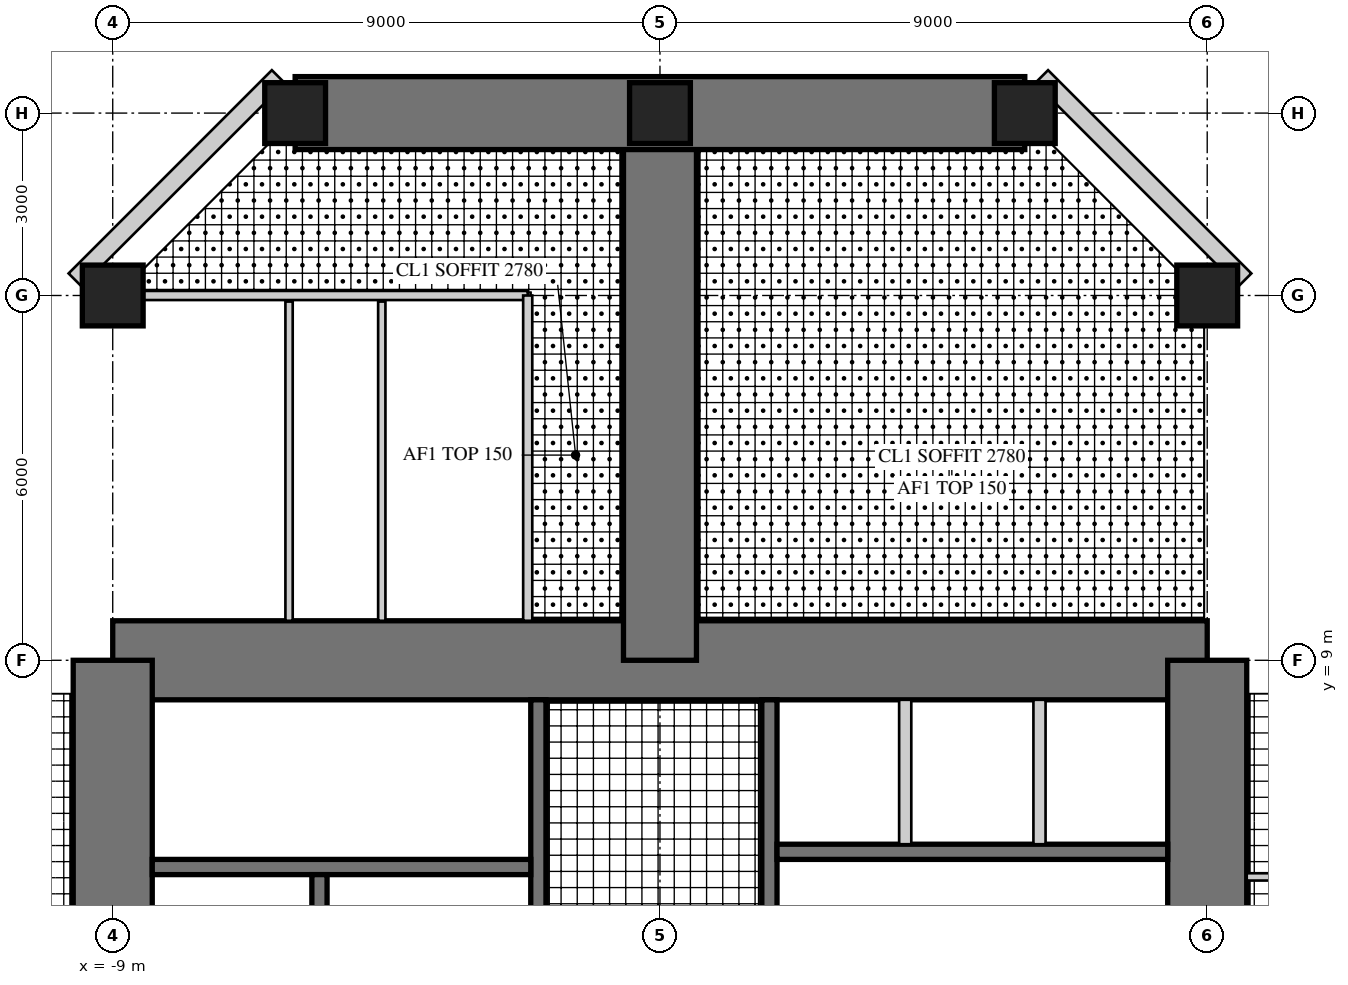
"""IFC4 building model, lengths in metres.
Left out: names, types, materials, properties, quantities, classifications, styles, units other than length and angle.
Written with IfcOpenShell. Run it as: python <this file> out.ifc"""

import sys

from ifc_helpers import new_model, si_unit, direction, frame, frame_2d, origin, origin_2d, place, context, subcontext, project, spatial, rectangle, hollow_rectangle, extrude, element, fill, save


model = new_model("IFC4")
c1 = context("Model", 3, precision=1e-05, world=origin(), true_north=direction((0.0, 1.0)))
c2 = subcontext(c1, "Body", "Model", "MODEL_VIEW")
j1 = project(units=[si_unit("LENGTHUNIT", "METRE"), si_unit("PLANEANGLEUNIT", "RADIAN")], contexts=[c1])
p1 = place(None, origin())
s1 = spatial("IfcSite", under=j1, at=p1, CompositionType="ELEMENT")
p2 = place(p1, origin())
s2 = spatial("IfcBuilding", under=s1, at=p2, CompositionType="ELEMENT")
p3 = place(p2, frame((0.0, 0.0, 144.5)))
s3 = spatial("IfcBuildingStorey", under=s2, at=p3, CompositionType="ELEMENT", Elevation=144.5)
p4 = place(p3, frame((9.0, 9.0, 0.0), z_axis=(0.0, 0.0, 1.0), x_axis=(-1.0, 0.0, 0.0)))
e1 = element("IfcWall", 1, at=p4, inside=s3, PredefinedType="SHEAR", context=c2, shape_type="SweptSolid", body=[
    extrude(rectangle(XDim=18.0, YDim=1.3, at=frame_2d((9.0, 0.0))), origin(), (0.0, 0.0, 1.0), 4.0),
])
p5 = place(p4, frame((9.8, 0.0, 0.0)))
e2 = element("IfcOpeningElement", 2, at=p5, cuts=e1, PredefinedType="OPENING", context=c2, shape_type="SweptSolid", body=[
    extrude(rectangle(XDim=1.0, YDim=2.4, at=frame_2d((0.5, 1.2))), frame((0.0, 0.66, 0.0), z_axis=(0.0, -1.0, 0.0), x_axis=(1.0, 0.0, 0.0)), (0.0, 0.0, 1.0), 1.32),
])
p6 = place(p3, frame((9.0, -9.0, 0.0), z_axis=(0.0, 0.0, 1.0), x_axis=(0.0, 1.0, 0.0)))
e3 = element("IfcWall", 3, at=p6, inside=s3, PredefinedType="SHEAR", context=c2, shape_type="SweptSolid", body=[
    extrude(rectangle(XDim=18.0, YDim=1.3, at=frame_2d((9.0, 0.0))), origin(), (0.0, 0.0, 1.0), 4.0),
])
p7 = place(p6, frame((9.8, 0.0, 0.0)))
e4 = element("IfcOpeningElement", 4, at=p7, cuts=e3, PredefinedType="OPENING", context=c2, shape_type="SweptSolid", body=[
    extrude(rectangle(XDim=1.0, YDim=2.4, at=frame_2d((0.5, 1.2))), frame((0.0, 0.66, 0.0), z_axis=(0.0, -1.0, 0.0), x_axis=(1.0, 0.0, 0.0)), (0.0, 0.0, 1.0), 1.32),
])
p8 = place(p3, frame((-9.0, 9.0, 0.0), z_axis=(0.0, 0.0, 1.0), x_axis=(0.0, -1.0, 0.0)))
e5 = element("IfcWall", 5, at=p8, inside=s3, PredefinedType="SHEAR", context=c2, shape_type="SweptSolid", body=[
    extrude(rectangle(XDim=18.0, YDim=1.3, at=frame_2d((9.0, 0.0))), origin(), (0.0, 0.0, 1.0), 4.0),
])
p9 = place(p8, frame((9.8, 0.0, 0.0)))
e6 = element("IfcOpeningElement", 6, at=p9, cuts=e5, PredefinedType="OPENING", context=c2, shape_type="SweptSolid", body=[
    extrude(rectangle(XDim=1.0, YDim=2.4, at=frame_2d((0.5, 1.2))), frame((0.0, 0.66, 0.0), z_axis=(0.0, -1.0, 0.0), x_axis=(1.0, 0.0, 0.0)), (0.0, 0.0, 1.0), 1.32),
])
p10 = place(p3, frame((1.8, 1.875, 0.0), z_axis=(0.0, 0.0, 1.0), x_axis=(0.0, 1.0, 0.0)))
e7 = element("IfcWall", 7, at=p10, inside=s3, PredefinedType="SHEAR", context=c2, shape_type="SweptSolid", body=[
    extrude(rectangle(XDim=6.475, YDim=0.25, at=frame_2d((3.238, 0.0))), origin(), (0.0, 0.0, 1.0), 4.0),
])
p11 = place(p10, frame((1.875, 0.0, 0.0)))
e8 = element("IfcOpeningElement", 8, at=p11, cuts=e7, PredefinedType="OPENING", context=c2, shape_type="SweptSolid", body=[
    extrude(rectangle(XDim=1.6, YDim=2.4, at=frame_2d((0.8, 1.2))), frame((0.0, 0.135, 0.0), z_axis=(0.0, -1.0, 0.0), x_axis=(1.0, 0.0, 0.0)), (0.0, 0.0, 1.0), 0.27),
])
p12 = place(p3, frame((1.925, 5.85, 0.0), z_axis=(0.0, 0.0, 1.0), x_axis=(1.0, 0.0, 0.0)))
e9 = element("IfcWall", 9, at=p12, inside=s3, PredefinedType="SHEAR", context=c2, shape_type="SweptSolid", body=[
    extrude(rectangle(XDim=6.425, YDim=0.25, at=frame_2d((3.212, 0.0))), origin(), (0.0, 0.0, 1.0), 4.0),
])
p13 = place(p12, frame((0.454, 0.0, 0.0)))
e10 = element("IfcOpeningElement", 10, at=p13, cuts=e9, PredefinedType="OPENING", context=c2, shape_type="SweptSolid", body=[
    extrude(rectangle(XDim=1.1, YDim=2.2, at=frame_2d((0.55, 1.1))), frame((0.0, 0.135, 0.0), z_axis=(0.0, -1.0, 0.0), x_axis=(1.0, 0.0, 0.0)), (0.0, 0.0, 1.0), 0.27),
])
p14 = place(p12, frame((2.663, 0.0, 0.0)))
e11 = element("IfcOpeningElement", 11, at=p14, cuts=e9, PredefinedType="OPENING", context=c2, shape_type="SweptSolid", body=[
    extrude(rectangle(XDim=1.1, YDim=2.2, at=frame_2d((0.55, 1.1))), frame((0.0, 0.135, 0.0), z_axis=(0.0, -1.0, 0.0), x_axis=(1.0, 0.0, 0.0)), (0.0, 0.0, 1.0), 0.27),
])
p15 = place(p12, frame((4.871, 0.0, 0.0)))
e12 = element("IfcOpeningElement", 12, at=p15, cuts=e9, PredefinedType="OPENING", context=c2, shape_type="SweptSolid", body=[
    extrude(rectangle(XDim=1.1, YDim=2.2, at=frame_2d((0.55, 1.1))), frame((0.0, 0.135, 0.0), z_axis=(0.0, -1.0, 0.0), x_axis=(1.0, 0.0, 0.0)), (0.0, 0.0, 1.0), 0.27),
])
for number, where, z_axis, x_axis in (
    (13, (4.033, 5.975, 0.0), (0.0, 0.0, 1.0), (0.0, 1.0, 0.0)),
    (14, (6.242, 5.975, 0.0), (0.0, 0.0, 1.0), (0.0, 1.0, 0.0)),
):
    element("IfcWall", number, at=place(p3, frame(where, z_axis=z_axis, x_axis=x_axis)), inside=s3, PredefinedType="PARTITIONING", context=c2, shape_type="SweptSolid", body=[
        extrude(rectangle(XDim=2.375, YDim=0.2, at=frame_2d((1.188, 0.0))), origin(), (0.0, 0.0, 1.0), 4.0),
    ])
p16 = place(p3, frame((-2.0, 1.675, 0.0), z_axis=(0.0, 0.0, 1.0), x_axis=(0.0, 1.0, 0.0)))
e15 = element("IfcWall", 15, at=p16, inside=s3, PredefinedType="SHEAR", context=c2, shape_type="SweptSolid", body=[
    extrude(rectangle(XDim=6.675, YDim=0.25, at=frame_2d((3.337, 0.0))), origin(), (0.0, 0.0, 1.0), 4.0),
])
p17 = place(p16, frame((0.725, 0.0, 0.0)))
e16 = element("IfcOpeningElement", 16, at=p17, cuts=e15, PredefinedType="OPENING", context=c2, shape_type="SweptSolid", body=[
    extrude(rectangle(XDim=1.0, YDim=2.1, at=frame_2d((0.5, 1.05))), frame((0.0, 0.135, 0.0), z_axis=(0.0, -1.0, 0.0), x_axis=(1.0, 0.0, 0.0)), (0.0, 0.0, 1.0), 0.27),
])
p18 = place(p3, frame((-2.125, 5.6, 0.0), z_axis=(0.0, 0.0, 1.0), x_axis=(-1.0, 0.0, 0.0)))
e17 = element("IfcWall", 17, at=p18, inside=s3, PredefinedType="SHEAR", context=c2, shape_type="SweptSolid", body=[
    extrude(rectangle(XDim=6.225, YDim=0.25, at=frame_2d((3.113, 0.0))), origin(), (0.0, 0.0, 1.0), 4.0),
])
p19 = place(p18, frame((0.175, 0.0, 0.0)))
e18 = element("IfcOpeningElement", 18, at=p19, cuts=e17, PredefinedType="OPENING", context=c2, shape_type="SweptSolid", body=[
    extrude(rectangle(XDim=1.0, YDim=2.1, at=frame_2d((0.5, 1.05))), frame((0.0, 0.135, 0.0), z_axis=(0.0, -1.0, 0.0), x_axis=(1.0, 0.0, 0.0)), (0.0, 0.0, 1.0), 0.27),
])
p20 = place(p3, frame((-5.6, 1.925, 0.0), z_axis=(0.0, 0.0, 1.0), x_axis=(0.0, 1.0, 0.0)))
e19 = element("IfcWall", 19, at=p20, inside=s3, PredefinedType="SHEAR", context=c2, shape_type="SweptSolid", body=[
    extrude(rectangle(XDim=3.55, YDim=0.25, at=frame_2d((1.775, 0.0))), origin(), (0.0, 0.0, 1.0), 4.0),
])
p21 = place(p20, frame((1.525, 0.0, 0.0)))
e20 = element("IfcOpeningElement", 20, at=p21, cuts=e19, PredefinedType="OPENING", context=c2, shape_type="SweptSolid", body=[
    extrude(rectangle(XDim=1.1, YDim=2.2, at=frame_2d((0.55, 1.1))), frame((0.0, 0.135, 0.0), z_axis=(0.0, -1.0, 0.0), x_axis=(1.0, 0.0, 0.0)), (0.0, 0.0, 1.0), 0.27),
])
p22 = place(p20, frame((0.075, 0.0, 0.0)))
e21 = element("IfcOpeningElement", 21, at=p22, cuts=e19, PredefinedType="OPENING", context=c2, shape_type="SweptSolid", body=[
    extrude(rectangle(XDim=0.8, YDim=2.1, at=frame_2d((0.4, 1.05))), frame((0.0, 0.135, 0.0), z_axis=(0.0, -1.0, 0.0), x_axis=(1.0, 0.0, 0.0)), (0.0, 0.0, 1.0), 0.27),
])
p23 = place(p3, frame((0.0, 9.0, 0.0), z_axis=(0.0, 0.0, 1.0), x_axis=(0.0, 1.0, 0.0)))
e22 = element("IfcWall", 22, at=p23, inside=s3, PredefinedType="SHEAR", context=c2, shape_type="SweptSolid", body=[
    extrude(rectangle(XDim=9.0, YDim=1.2, at=frame_2d((4.5, 0.0))), origin(), (0.0, 0.0, 1.0), 4.0),
])
p24 = place(p23, frame((4.3, 0.0, 0.0)))
e23 = element("IfcOpeningElement", 23, at=p24, cuts=e22, PredefinedType="OPENING", context=c2, shape_type="SweptSolid", body=[
    extrude(rectangle(XDim=1.0, YDim=2.2, at=frame_2d((0.5, 1.1))), frame((0.0, 0.61, 0.0), z_axis=(0.0, -1.0, 0.0), x_axis=(1.0, 0.0, 0.0)), (0.0, 0.0, 1.0), 1.22),
])
p25 = place(p3, frame((6.0, 18.0, 0.0), z_axis=(0.0, 0.0, 1.0), x_axis=(-1.0, 0.0, 0.0)))
e24 = element("IfcWall", 24, at=p25, inside=s3, PredefinedType="SHEAR", context=c2, shape_type="SweptSolid", body=[
    extrude(rectangle(XDim=12.0, YDim=1.2, at=frame_2d((6.0, 0.0))), origin(), (0.0, 0.0, 1.0), 4.0),
])
p26 = place(p25, frame((1.55, 0.0, 0.6)))
e25 = element("IfcOpeningElement", 25, at=p26, cuts=e24, PredefinedType="OPENING", context=c2, shape_type="SweptSolid", body=[
    extrude(rectangle(XDim=3.0, YDim=2.4, at=frame_2d((1.5, 1.2))), frame((0.0, 0.61, 0.0), z_axis=(0.0, -1.0, 0.0), x_axis=(1.0, 0.0, 0.0)), (0.0, 0.0, 1.0), 1.22),
])
p27 = place(p25, frame((7.45, 0.0, 0.6)))
e26 = element("IfcOpeningElement", 26, at=p27, cuts=e24, PredefinedType="OPENING", context=c2, shape_type="SweptSolid", body=[
    extrude(rectangle(XDim=3.0, YDim=2.4, at=frame_2d((1.5, 1.2))), frame((0.0, 0.61, 0.0), z_axis=(0.0, -1.0, 0.0), x_axis=(1.0, 0.0, 0.0)), (0.0, 0.0, 1.0), 1.22),
])
for number, where, z_axis, x_axis in (
    (27, (9.0, 15.0, 0.0), (0.0, 0.0, 1.0), (1.0, 0.0, 0.0)),
    (28, (-9.0, 15.0, 0.0), (0.0, 0.0, 1.0), (1.0, 0.0, 0.0)),
    (29, (6.0, 18.0, 0.0), (0.0, 0.0, 1.0), (1.0, 0.0, 0.0)),
    (30, (0.0, 18.0, 0.0), (0.0, 0.0, 1.0), (1.0, 0.0, 0.0)),
    (31, (-6.0, 18.0, 0.0), (0.0, 0.0, 1.0), (1.0, 0.0, 0.0)),
):
    element("IfcColumn", number, at=place(p3, frame(where, z_axis=z_axis, x_axis=x_axis)), inside=s3, PredefinedType="COLUMN", context=c2, shape_type="SweptSolid", body=[
        extrude(rectangle(XDim=1.0, YDim=1.0, at=origin_2d()), origin(), (0.0, 0.0, 1.0), 4.0),
    ])
p28 = place(p3, frame((9.62, 15.257, 0.0), z_axis=(0.0, 0.0, 1.0), x_axis=(-0.707106781187, 0.707106781187, 0.0)))
e32 = element("IfcWall", 32, at=p28, inside=s3, PredefinedType="SOLIDWALL", context=c2, shape_type="SweptSolid", body=[
    extrude(rectangle(XDim=4.728, YDim=0.3, at=frame_2d((2.364, 0.0))), origin(), (0.0, 0.0, 1.0), 3.8),
])
p29 = place(p28, frame((1.914, 0.0, 0.3)))
e33 = element("IfcOpeningElement", 33, at=p29, cuts=e32, PredefinedType="OPENING", context=c2, shape_type="SweptSolid", body=[
    extrude(rectangle(XDim=0.9, YDim=2.4, at=frame_2d((0.45, 1.2))), frame((0.0, 0.16, 0.0), z_axis=(0.0, -1.0, 0.0), x_axis=(1.0, 0.0, 0.0)), (0.0, 0.0, 1.0), 0.32),
])
p30 = place(p3, frame((-6.277, 18.6, 0.0), z_axis=(0.0, 0.0, 1.0), x_axis=(-0.707106781187, -0.707106781187, 0.0)))
e34 = element("IfcWall", 34, at=p30, inside=s3, PredefinedType="SOLIDWALL", context=c2, shape_type="SweptSolid", body=[
    extrude(rectangle(XDim=4.728, YDim=0.3, at=frame_2d((2.364, 0.0))), origin(), (0.0, 0.0, 1.0), 3.8),
])
p31 = place(p30, frame((1.914, 0.0, 0.3)))
e35 = element("IfcOpeningElement", 35, at=p31, cuts=e34, PredefinedType="OPENING", context=c2, shape_type="SweptSolid", body=[
    extrude(rectangle(XDim=0.9, YDim=2.4, at=frame_2d((0.45, 1.2))), frame((0.0, 0.16, 0.0), z_axis=(0.0, -1.0, 0.0), x_axis=(1.0, 0.0, 0.0)), (0.0, 0.0, 1.0), 0.32),
])
p32 = place(p3, frame((-2.175, 15.0, 0.0), z_axis=(0.0, 0.0, 1.0), x_axis=(-1.0, 0.0, 0.0)))
e36 = element("IfcWall", 36, at=p32, inside=s3, PredefinedType="PARTITIONING", context=c2, shape_type="SweptSolid", body=[
    extrude(rectangle(XDim=6.325, YDim=0.15, at=frame_2d((3.163, 0.0))), origin(), (0.0, 0.0, 1.0), 3.0),
])
p33 = place(p32, frame((0.7, 0.0, 0.0)))
e37 = element("IfcOpeningElement", 37, at=p33, cuts=e36, PredefinedType="OPENING", context=c2, shape_type="SweptSolid", body=[
    extrude(rectangle(XDim=1.0, YDim=2.1, at=frame_2d((0.5, 1.05))), frame((0.0, 0.085, 0.0), z_axis=(0.0, -1.0, 0.0), x_axis=(1.0, 0.0, 0.0)), (0.0, 0.0, 1.0), 0.17),
])
p34 = place(p32, frame((2.663, 0.0, 0.0)))
e38 = element("IfcOpeningElement", 38, at=p34, cuts=e36, PredefinedType="OPENING", context=c2, shape_type="SweptSolid", body=[
    extrude(rectangle(XDim=1.0, YDim=2.1, at=frame_2d((0.5, 1.05))), frame((0.0, 0.085, 0.0), z_axis=(0.0, -1.0, 0.0), x_axis=(1.0, 0.0, 0.0)), (0.0, 0.0, 1.0), 0.17),
])
p35 = place(p32, frame((4.625, 0.0, 0.0)))
e39 = element("IfcOpeningElement", 39, at=p35, cuts=e36, PredefinedType="OPENING", context=c2, shape_type="SweptSolid", body=[
    extrude(rectangle(XDim=1.0, YDim=2.1, at=frame_2d((0.5, 1.05))), frame((0.0, 0.085, 0.0), z_axis=(0.0, -1.0, 0.0), x_axis=(1.0, 0.0, 0.0)), (0.0, 0.0, 1.0), 0.17),
])
p36 = place(p3, frame((-2.175, 9.65, 0.0), z_axis=(0.0, 0.0, 1.0), x_axis=(0.0, 1.0, 0.0)))
e40 = element("IfcWall", 40, at=p36, inside=s3, PredefinedType="PARTITIONING", context=c2, shape_type="SweptSolid", body=[
    extrude(rectangle(XDim=5.35, YDim=0.15, at=frame_2d((2.675, 0.0))), origin(), (0.0, 0.0, 1.0), 3.8),
])
p37 = place(p3, frame((-4.575, 9.65, 0.0), z_axis=(0.0, 0.0, 1.0), x_axis=(0.0, 1.0, 0.0)))
e41 = element("IfcWall", 41, at=p37, inside=s3, PredefinedType="PLUMBINGWALL", context=c2, shape_type="SweptSolid", body=[
    extrude(rectangle(XDim=5.25, YDim=0.12, at=frame_2d((2.625, 0.0))), origin(), (0.0, 0.0, 1.0), 3.8),
])
p38 = place(p3, frame((-6.1, 9.65, 0.0), z_axis=(0.0, 0.0, 1.0), x_axis=(0.0, 1.0, 0.0)))
e42 = element("IfcWall", 42, at=p38, inside=s3, PredefinedType="PLUMBINGWALL", context=c2, shape_type="SweptSolid", body=[
    extrude(rectangle(XDim=5.25, YDim=0.12, at=frame_2d((2.625, 0.0))), origin(), (0.0, 0.0, 1.0), 3.1),
])
p39 = place(p3, frame((9.65, 5.438, 0.0), z_axis=(0.0, 0.0, 1.0), x_axis=(1.0, 0.0, 0.0)))
e43 = element("IfcWall", 43, at=p39, inside=s3, PredefinedType="PLUMBINGWALL", context=c2, shape_type="SweptSolid", body=[
    extrude(rectangle(XDim=5.25, YDim=0.12, at=frame_2d((2.625, 0.0))), origin(), (0.0, 0.0, 1.0), 3.8),
])
p40 = place(p29, origin())
e44 = element("IfcWindow", 44, at=p40, inside=s3, PartitioningType="SINGLE_PANEL", PredefinedType="WINDOW", context=c2, shape_type="SweptSolid", body=[
    extrude(hollow_rectangle(XDim=0.9, YDim=2.4, WallThickness=0.06, at=frame_2d((0.45, 1.2))), frame((0.0, 0.03, 0.0), z_axis=(0.0, -1.0, 0.0), x_axis=(1.0, 0.0, 0.0)), (0.0, 0.0, 1.0), 0.06),
    extrude(rectangle(XDim=0.779, YDim=2.279, at=frame_2d((0.45, 1.2))), frame((0.0, 0.03, 0.0), z_axis=(0.0, -1.0, 0.0), x_axis=(1.0, 0.0, 0.0)), (0.0, 0.0, 1.0), 0.06),
])
fill(e33, e44)
p41 = place(p26, origin())
e45 = element("IfcWindow", 45, at=p41, inside=s3, PartitioningType="SINGLE_PANEL", PredefinedType="WINDOW", context=c2, shape_type="SweptSolid", body=[
    extrude(hollow_rectangle(XDim=3.0, YDim=2.4, WallThickness=0.06, at=frame_2d((1.5, 1.2))), frame((0.0, 0.03, 0.0), z_axis=(0.0, -1.0, 0.0), x_axis=(1.0, 0.0, 0.0)), (0.0, 0.0, 1.0), 0.06),
    extrude(rectangle(XDim=2.879, YDim=2.279, at=frame_2d((1.5, 1.2))), frame((0.0, 0.03, 0.0), z_axis=(0.0, -1.0, 0.0), x_axis=(1.0, 0.0, 0.0)), (0.0, 0.0, 1.0), 0.06),
])
fill(e25, e45)
p42 = place(p27, origin())
e46 = element("IfcWindow", 46, at=p42, inside=s3, PartitioningType="SINGLE_PANEL", PredefinedType="WINDOW", context=c2, shape_type="SweptSolid", body=[
    extrude(hollow_rectangle(XDim=3.0, YDim=2.4, WallThickness=0.06, at=frame_2d((1.5, 1.2))), frame((0.0, 0.03, 0.0), z_axis=(0.0, -1.0, 0.0), x_axis=(1.0, 0.0, 0.0)), (0.0, 0.0, 1.0), 0.06),
    extrude(rectangle(XDim=2.879, YDim=2.279, at=frame_2d((1.5, 1.2))), frame((0.0, 0.03, 0.0), z_axis=(0.0, -1.0, 0.0), x_axis=(1.0, 0.0, 0.0)), (0.0, 0.0, 1.0), 0.06),
])
fill(e26, e46)
p43 = place(p31, origin())
e47 = element("IfcWindow", 47, at=p43, inside=s3, PartitioningType="SINGLE_PANEL", PredefinedType="WINDOW", context=c2, shape_type="SweptSolid", body=[
    extrude(hollow_rectangle(XDim=0.9, YDim=2.4, WallThickness=0.06, at=frame_2d((0.45, 1.2))), frame((0.0, 0.03, 0.0), z_axis=(0.0, -1.0, 0.0), x_axis=(1.0, 0.0, 0.0)), (0.0, 0.0, 1.0), 0.06),
    extrude(rectangle(XDim=0.779, YDim=2.279, at=frame_2d((0.45, 1.2))), frame((0.0, 0.03, 0.0), z_axis=(0.0, -1.0, 0.0), x_axis=(1.0, 0.0, 0.0)), (0.0, 0.0, 1.0), 0.06),
])
fill(e35, e47)
p44 = place(p33, origin())
e48 = element("IfcDoor", 48, at=p44, inside=s3, OperationType="SINGLE_SWING_LEFT", PredefinedType="DOOR", context=c2, shape_type="SweptSolid", body=[
    extrude(rectangle(XDim=1.0, YDim=2.1, at=frame_2d((0.5, 1.05))), frame((0.0, 0.025, 0.0), z_axis=(0.0, -1.0, 0.0), x_axis=(1.0, 0.0, 0.0)), (0.0, 0.0, 1.0), 0.05),
])
fill(e37, e48)
p45 = place(p34, origin())
e49 = element("IfcDoor", 49, at=p45, inside=s3, OperationType="SINGLE_SWING_LEFT", PredefinedType="DOOR", context=c2, shape_type="SweptSolid", body=[
    extrude(rectangle(XDim=1.0, YDim=2.1, at=frame_2d((0.5, 1.05))), frame((0.0, 0.025, 0.0), z_axis=(0.0, -1.0, 0.0), x_axis=(1.0, 0.0, 0.0)), (0.0, 0.0, 1.0), 0.05),
])
fill(e38, e49)
p46 = place(p35, origin())
e50 = element("IfcDoor", 50, at=p46, inside=s3, OperationType="SINGLE_SWING_LEFT", PredefinedType="DOOR", context=c2, shape_type="SweptSolid", body=[
    extrude(rectangle(XDim=1.0, YDim=2.1, at=frame_2d((0.5, 1.05))), frame((0.0, 0.025, 0.0), z_axis=(0.0, -1.0, 0.0), x_axis=(1.0, 0.0, 0.0)), (0.0, 0.0, 1.0), 0.05),
])
fill(e39, e50)
p47 = place(p24, origin())
e51 = element("IfcDoor", 51, at=p47, inside=s3, OperationType="SINGLE_SWING_RIGHT", PredefinedType="DOOR", context=c2, shape_type="SweptSolid", body=[
    extrude(rectangle(XDim=1.0, YDim=2.2, at=frame_2d((0.5, 1.1))), frame((0.0, 0.025, 0.0), z_axis=(0.0, -1.0, 0.0), x_axis=(1.0, 0.0, 0.0)), (0.0, 0.0, 1.0), 0.05),
])
fill(e23, e51)
p48 = place(p5, frame((1.0, 0.0, 0.0), z_axis=(0.0, 0.0, 1.0), x_axis=(-1.0, 0.0, 0.0)))
e52 = element("IfcDoor", 52, at=p48, inside=s3, OperationType="SINGLE_SWING_RIGHT", PredefinedType="DOOR", context=c2, shape_type="SweptSolid", body=[
    extrude(rectangle(XDim=1.0, YDim=2.4, at=frame_2d((0.5, 1.2))), frame((0.0, -0.005, 0.0), z_axis=(0.0, -1.0, 0.0), x_axis=(1.0, 0.0, 0.0)), (0.0, 0.0, 1.0), 0.05),
])
fill(e2, e52)
p49 = place(p13, origin())
e53 = element("IfcDoor", 53, at=p49, inside=s3, OperationType="DOUBLE_DOOR_SLIDING", PredefinedType="DOOR", context=c2, shape_type="SweptSolid", body=[
    extrude(rectangle(XDim=1.1, YDim=2.2, at=frame_2d((0.55, 1.1))), frame((0.0, 0.025, 0.0), z_axis=(0.0, -1.0, 0.0), x_axis=(1.0, 0.0, 0.0)), (0.0, 0.0, 1.0), 0.05),
])
fill(e10, e53)
p50 = place(p14, origin())
e54 = element("IfcDoor", 54, at=p50, inside=s3, OperationType="DOUBLE_DOOR_SLIDING", PredefinedType="DOOR", context=c2, shape_type="SweptSolid", body=[
    extrude(rectangle(XDim=1.1, YDim=2.2, at=frame_2d((0.55, 1.1))), frame((0.0, 0.025, 0.0), z_axis=(0.0, -1.0, 0.0), x_axis=(1.0, 0.0, 0.0)), (0.0, 0.0, 1.0), 0.05),
])
fill(e11, e54)
p51 = place(p15, origin())
e55 = element("IfcDoor", 55, at=p51, inside=s3, OperationType="DOUBLE_DOOR_SLIDING", PredefinedType="DOOR", context=c2, shape_type="SweptSolid", body=[
    extrude(rectangle(XDim=1.1, YDim=2.2, at=frame_2d((0.55, 1.1))), frame((0.0, 0.025, 0.0), z_axis=(0.0, -1.0, 0.0), x_axis=(1.0, 0.0, 0.0)), (0.0, 0.0, 1.0), 0.05),
])
fill(e12, e55)
p52 = place(p11, origin())
e56 = element("IfcDoor", 56, at=p52, inside=s3, OperationType="DOUBLE_DOOR_DOUBLE_SWING", PredefinedType="DOOR", context=c2, shape_type="SweptSolid", body=[
    extrude(rectangle(XDim=1.6, YDim=2.4, at=frame_2d((0.8, 1.2))), frame((0.0, 0.025, 0.0), z_axis=(0.0, -1.0, 0.0), x_axis=(1.0, 0.0, 0.0)), (0.0, 0.0, 1.0), 0.05),
])
fill(e8, e56)
p53 = place(p19, frame((1.0, 0.0, 0.0), z_axis=(0.0, 0.0, 1.0), x_axis=(-1.0, 0.0, 0.0)))
e57 = element("IfcDoor", 57, at=p53, inside=s3, OperationType="SINGLE_SWING_RIGHT", PredefinedType="DOOR", context=c2, shape_type="SweptSolid", body=[
    extrude(rectangle(XDim=1.0, YDim=2.1, at=frame_2d((0.5, 1.05))), frame((0.0, 0.025, 0.0), z_axis=(0.0, -1.0, 0.0), x_axis=(1.0, 0.0, 0.0)), (0.0, 0.0, 1.0), 0.05),
])
fill(e18, e57)
save(model, sys.argv[1])
